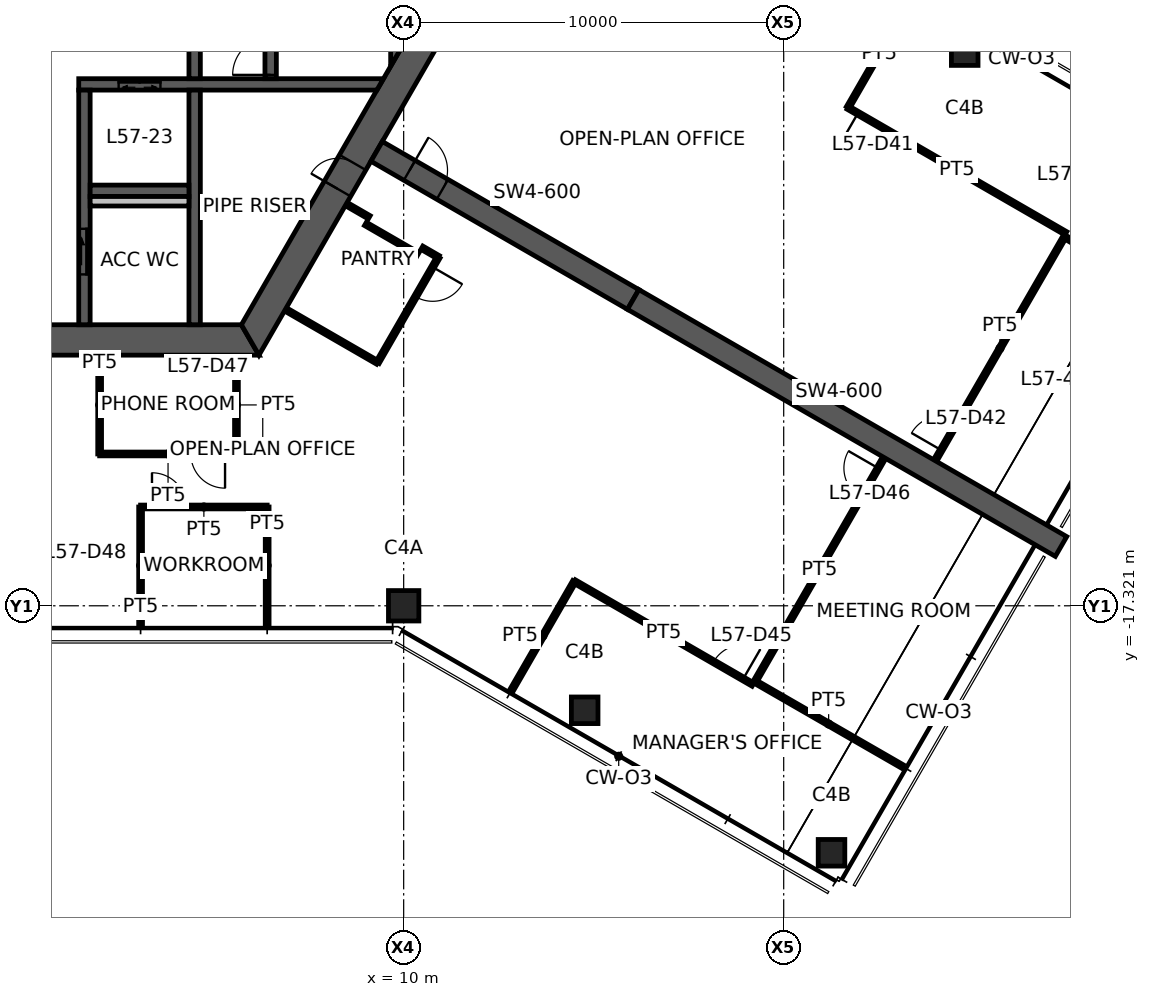
"""IFC4 building model, lengths in metres.
Left out: names, types, materials, properties, quantities, classifications, styles, units other than length and angle.
Written with IfcOpenShell. Run it as: python <this file> out.ifc"""

import sys

from ifc_helpers import new_model, si_unit, direction, frame, frame_2d, origin, origin_2d, place, context, subcontext, project, spatial, polyline, rectangle, hollow_rectangle, outline, extrude, element, fill, save


model = new_model("IFC4")
c1 = context("Model", 3, precision=1e-05, world=origin(), true_north=direction((0.0, 1.0)))
c2 = subcontext(c1, "Body", "Model", "MODEL_VIEW")
j1 = project(units=[si_unit("LENGTHUNIT", "METRE"), si_unit("PLANEANGLEUNIT", "RADIAN")], contexts=[c1])
p1 = place(None, origin())
s1 = spatial("IfcSite", under=j1, at=p1, CompositionType="ELEMENT")
p2 = place(p1, origin())
s2 = spatial("IfcBuilding", under=s1, at=p2, CompositionType="ELEMENT")
p3 = place(p2, frame((0.0, 0.0, 228.4)))
s3 = spatial("IfcBuildingStorey", under=s2, at=p3, CompositionType="ELEMENT", Elevation=228.4)
p4 = place(p3, frame((10.0, -17.321, 0.0), z_axis=(0.0, 0.0, 1.0), x_axis=(1.0, 0.0, 0.0)))
e1 = element("IfcColumn", 1, at=p4, inside=s3, PredefinedType="COLUMN", context=c2, shape_type="SweptSolid", body=[
    extrude(hollow_rectangle(XDim=0.8, YDim=0.8, WallThickness=0.04, at=origin_2d()), origin(), (0.0, 0.0, 1.0), 3.9),
])
for number, where, z_axis, x_axis in (
    (2, (14.763, -20.071, 0.0), (0.0, 0.0, 1.0), (1.0, 0.0, 0.0)),
    (3, (21.258, -23.821, 0.0), (0.0, 0.0, 1.0), (1.0, 0.0, 0.0)),
    (4, (24.763, -2.75, 0.0), (0.0, 0.0, 1.0), (1.0, 0.0, 0.0)),
):
    element("IfcColumn", number, at=place(p3, frame(where, z_axis=z_axis, x_axis=x_axis)), inside=s3, PredefinedType="COLUMN", context=c2, shape_type="SweptSolid", body=[
        extrude(hollow_rectangle(XDim=0.7, YDim=0.7, WallThickness=0.032, at=origin_2d()), origin(), (0.0, 0.0, 1.0), 3.9),
    ])
p5 = place(p3, frame((-5.961, -10.325, 0.0), z_axis=(0.0, 0.0, 1.0), x_axis=(1.0, 0.0, 0.0)))
e5 = element("IfcWall", 5, at=p5, inside=s3, PredefinedType="SHEAR", context=c2, shape_type="SweptSolid", body=[
    extrude(outline(polyline([(-0.231, -0.4), (5.461, -0.4), (6.461, -0.4), (12.153, -0.4), (11.691, 0.4), (6.461, 0.4), (5.461, 0.4), (0.231, 0.4), (-0.231, -0.4)])), origin(), (0.0, 0.0, 1.0), 3.9),
])
p6 = place(p5, frame((5.461, 0.0, 0.0)))
e6 = element("IfcOpeningElement", 6, at=p6, cuts=e5, PredefinedType="OPENING", context=c2, shape_type="SweptSolid", body=[
    extrude(rectangle(XDim=1.0, YDim=2.1, at=frame_2d((0.5, 1.05))), frame((0.0, 0.41, 0.0), z_axis=(0.0, -1.0, 0.0), x_axis=(1.0, 0.0, 0.0)), (0.0, 0.0, 1.0), 0.82),
])
p7 = place(p3, frame((5.961, -10.325, 0.0), z_axis=(0.0, 0.0, 1.0), x_axis=(0.500004296715, 0.866022923061, 0.0)))
e7 = element("IfcWall", 7, at=p7, inside=s3, PredefinedType="SHEAR", context=c2, shape_type="SweptSolid", body=[
    extrude(outline(polyline([(-0.231, -0.4), (4.594, -0.4), (5.394, -0.4), (12.153, -0.4), (11.691, 0.4), (5.394, 0.4), (4.594, 0.4), (0.231, 0.4), (-0.231, -0.4)])), origin(), (0.0, 0.0, 1.0), 3.9),
])
p8 = place(p7, frame((4.594, 0.0, 0.0)))
e8 = element("IfcOpeningElement", 8, at=p8, cuts=e7, PredefinedType="OPENING", context=c2, shape_type="SweptSolid", body=[
    extrude(rectangle(XDim=0.8, YDim=2.1, at=frame_2d((0.4, 1.05))), frame((0.0, 0.41, 0.0), z_axis=(0.0, -1.0, 0.0), x_axis=(1.0, 0.0, 0.0)), (0.0, 0.0, 1.0), 0.82),
])
p9 = place(p3, frame((9.288, -5.363, 0.0), z_axis=(0.0, 0.0, 1.0), x_axis=(0.866031736626, -0.499989031036, 0.0)))
e9 = element("IfcWall", 9, at=p9, inside=s3, PredefinedType="SHEAR", context=c2, shape_type="SweptSolid", body=[
    extrude(rectangle(XDim=7.796, YDim=0.6, at=frame_2d((3.898, 0.0))), origin(), (0.0, 0.0, 1.0), 3.9),
])
p10 = place(p9, frame((1.0, 0.0, 0.0)))
e10 = element("IfcOpeningElement", 10, at=p10, cuts=e9, PredefinedType="OPENING", context=c2, shape_type="SweptSolid", body=[
    extrude(rectangle(XDim=1.0, YDim=2.1, at=frame_2d((0.5, 1.05))), frame((0.0, 0.31, 0.0), z_axis=(0.0, -1.0, 0.0), x_axis=(1.0, 0.0, 0.0)), (0.0, 0.0, 1.0), 0.62),
])
p11 = place(p3, frame((16.039, -9.26, 0.0), z_axis=(0.0, 0.0, 1.0), x_axis=(0.866024837091, -0.50000098154, 0.0)))
e11 = element("IfcWall", 11, at=p11, inside=s3, PredefinedType="SHEAR", context=c2, shape_type="SweptSolid", body=[
    extrude(rectangle(XDim=13.0, YDim=0.6, at=frame_2d((6.5, 0.0))), origin(), (0.0, 0.0, 1.0), 3.9),
])
p12 = place(p3, frame((1.45, -3.6, 0.0), z_axis=(0.0, 0.0, 1.0), x_axis=(1.0, 0.0, 0.0)))
e12 = element("IfcWall", 12, at=p12, inside=s3, PredefinedType="SHEAR", context=c2, shape_type="SweptSolid", body=[
    extrude(outline(polyline([(0.0, -0.15), (1.05, -0.15), (2.15, -0.15), (7.845, -0.15), (8.019, 0.15), (2.15, 0.15), (1.05, 0.15), (0.0, 0.15), (0.0, -0.15)])), origin(), (0.0, 0.0, 1.0), 3.9),
])
p13 = place(p12, frame((1.05, 0.0, 0.0)))
e13 = element("IfcOpeningElement", 13, at=p13, cuts=e12, PredefinedType="OPENING", context=c2, shape_type="SweptSolid", body=[
    extrude(rectangle(XDim=1.1, YDim=2.1, at=frame_2d((0.55, 1.05))), frame((0.0, 0.16, 0.0), z_axis=(0.0, -1.0, 0.0), x_axis=(1.0, 0.0, 0.0)), (0.0, 0.0, 1.0), 0.32),
])
p14 = place(p3, frame((1.6, -3.75, 0.0), z_axis=(0.0, 0.0, 1.0), x_axis=(0.0, -1.0, 0.0)))
e14 = element("IfcWall", 14, at=p14, inside=s3, PredefinedType="SHEAR", context=c2, shape_type="SweptSolid", body=[
    extrude(rectangle(XDim=6.175, YDim=0.3, at=frame_2d((3.087, 0.0))), origin(), (0.0, 0.0, 1.0), 3.9),
])
p15 = place(p14, frame((3.65, 0.0, 0.0)))
e15 = element("IfcOpeningElement", 15, at=p15, cuts=e14, PredefinedType="OPENING", context=c2, shape_type="SweptSolid", body=[
    extrude(rectangle(XDim=1.2, YDim=2.1, at=frame_2d((0.6, 1.05))), frame((0.0, 0.16, 0.0), z_axis=(0.0, -1.0, 0.0), x_axis=(1.0, 0.0, 0.0)), (0.0, 0.0, 1.0), 0.32),
])
p16 = place(p3, frame((4.5, -3.45, 0.0), z_axis=(0.0, 0.0, 1.0), x_axis=(0.0, 1.0, 0.0)))
e16 = element("IfcWall", 16, at=p16, inside=s3, PredefinedType="SHEAR", context=c2, shape_type="SweptSolid", body=[
    extrude(rectangle(XDim=6.9, YDim=0.3, at=frame_2d((3.45, 0.0))), origin(), (0.0, 0.0, 1.0), 3.9),
])
p17 = place(p16, frame((2.95, 0.0, 0.0)))
e17 = element("IfcOpeningElement", 17, at=p17, cuts=e16, PredefinedType="OPENING", context=c2, shape_type="SweptSolid", body=[
    extrude(rectangle(XDim=1.0, YDim=2.1, at=frame_2d((0.5, 1.05))), frame((0.0, 0.16, 0.0), z_axis=(0.0, -1.0, 0.0), x_axis=(1.0, 0.0, 0.0)), (0.0, 0.0, 1.0), 0.32),
])
p18 = place(p3, frame((6.5, -3.45, 0.0), z_axis=(0.0, 0.0, 1.0), x_axis=(0.0, 1.0, 0.0)))
e18 = element("IfcWall", 18, at=p18, inside=s3, PredefinedType="SHEAR", context=c2, shape_type="SweptSolid", body=[
    extrude(rectangle(XDim=6.9, YDim=0.3, at=frame_2d((3.45, 0.0))), origin(), (0.0, 0.0, 1.0), 3.9),
])
p19 = place(p18, frame((0.1, 0.0, 0.0)))
e19 = element("IfcOpeningElement", 19, at=p19, cuts=e18, PredefinedType="OPENING", context=c2, shape_type="SweptSolid", body=[
    extrude(rectangle(XDim=1.0, YDim=2.1, at=frame_2d((0.5, 1.05))), frame((0.0, 0.16, 0.0), z_axis=(0.0, -1.0, 0.0), x_axis=(1.0, 0.0, 0.0)), (0.0, 0.0, 1.0), 0.32),
])
p20 = place(p3, frame((4.5, -3.75, 0.0), z_axis=(0.0, 0.0, 1.0), x_axis=(0.0, -1.0, 0.0)))
e20 = element("IfcWall", 20, at=p20, inside=s3, PredefinedType="SHEAR", context=c2, shape_type="SweptSolid", body=[
    extrude(rectangle(XDim=6.175, YDim=0.3, at=frame_2d((3.087, 0.0))), origin(), (0.0, 0.0, 1.0), 3.9),
])
p21 = place(p3, frame((1.75, -6.4, 0.0), z_axis=(0.0, 0.0, 1.0), x_axis=(1.0, 0.0, 0.0)))
e21 = element("IfcWall", 21, at=p21, inside=s3, PredefinedType="SHEAR", context=c2, shape_type="SweptSolid", body=[
    extrude(rectangle(XDim=2.6, YDim=0.3, at=frame_2d((1.3, 0.0))), origin(), (0.0, 0.0, 1.0), 3.9),
])
p22 = place(p3, frame((9.808, -2.862, 0.0), z_axis=(0.0, 0.0, 1.0), x_axis=(0.0, 1.0, 0.0)))
e22 = element("IfcWall", 22, at=p22, inside=s3, PredefinedType="SHEAR", context=c2, shape_type="SweptSolid", body=[
    extrude(outline(polyline([(0.26, -0.15), (5.465, -0.15), (5.984, 0.15), (-0.26, 0.15), (0.26, -0.15)])), origin(), (0.0, 0.0, 1.0), 3.9),
])
p23 = place(p3, frame((1.75, -6.675, 0.0), z_axis=(0.0, 0.0, 1.0), x_axis=(1.0, 0.0, 0.0)))
e23 = element("IfcWall", 23, at=p23, inside=s3, PredefinedType="PLUMBINGWALL", context=c2, shape_type="SweptSolid", body=[
    extrude(rectangle(XDim=2.6, YDim=0.25, at=frame_2d((1.3, 0.0))), origin(), (0.0, 0.0, 1.0), 3.9),
])
p24 = place(p3, frame((30.25, -9.266, 0.0), z_axis=(0.0, 0.0, 1.0), x_axis=(-0.865342122637, 0.501181614577, 0.0)))
e24 = element("IfcWall", 24, at=p24, inside=s3, PredefinedType="PARTITIONING", context=c2, shape_type="SweptSolid", body=[
    extrude(rectangle(XDim=3.311, YDim=0.1, at=frame_2d((1.655, 0.0))), origin(), (0.0, 0.0, 1.0), 2.95),
])
p25 = place(p3, frame((21.692, -4.21, 0.0), z_axis=(0.0, 0.0, 1.0), x_axis=(0.50002956483, 0.866008333849, 0.0)))
e25 = element("IfcWall", 25, at=p25, inside=s3, PredefinedType="PARTITIONING", context=c2, shape_type="SweptSolid", body=[
    extrude(rectangle(XDim=3.28, YDim=0.1, at=frame_2d((1.64, 0.0))), origin(), (0.0, 0.0, 1.0), 2.95),
])
p26 = place(p3, frame((27.425, -7.52, 0.0), z_axis=(0.0, 0.0, 1.0), x_axis=(-0.866030817826, 0.499990622488, 0.0)))
e26 = element("IfcWall", 26, at=p26, inside=s3, PredefinedType="PARTITIONING", context=c2, shape_type="SweptSolid", body=[
    extrude(rectangle(XDim=6.62, YDim=0.1, at=frame_2d((3.31, 0.0))), origin(), (0.0, 0.0, 1.0), 2.95),
])
p27 = place(p26, frame((5.42, 0.0, 0.0)))
e27 = element("IfcOpeningElement", 27, at=p27, cuts=e26, PredefinedType="OPENING", context=c2, shape_type="SweptSolid", body=[
    extrude(rectangle(XDim=0.9, YDim=2.1, at=frame_2d((0.45, 1.05))), frame((0.0, 0.06, 0.0), z_axis=(0.0, -1.0, 0.0), x_axis=(1.0, 0.0, 0.0)), (0.0, 0.0, 1.0), 0.12),
])
p28 = place(p3, frame((23.993, -13.483, 0.0), z_axis=(0.0, 0.0, 1.0), x_axis=(0.500522347083, 0.865723616445, 0.0)))
e28 = element("IfcWall", 28, at=p28, inside=s3, PredefinedType="PARTITIONING", context=c2, shape_type="SweptSolid", body=[
    extrude(rectangle(XDim=6.78, YDim=0.1, at=frame_2d((3.39, 0.0))), origin(), (0.0, 0.0, 1.0), 2.95),
])
p29 = place(p28, frame((0.3, 0.0, 0.0)))
e29 = element("IfcOpeningElement", 29, at=p29, cuts=e28, PredefinedType="OPENING", context=c2, shape_type="SweptSolid", body=[
    extrude(rectangle(XDim=0.9, YDim=2.1, at=frame_2d((0.45, 1.05))), frame((0.0, 0.06, 0.0), z_axis=(0.0, -1.0, 0.0), x_axis=(1.0, 0.0, 0.0)), (0.0, 0.0, 1.0), 0.12),
])
p30 = place(p3, frame((8.505, -6.758, 0.0), z_axis=(0.0, 0.0, 1.0), x_axis=(0.865958369053, -0.50011608959, 0.0)))
e30 = element("IfcWall", 30, at=p30, inside=s3, PredefinedType="PARTITIONING", context=c2, shape_type="SweptSolid", body=[
    extrude(rectangle(XDim=0.68, YDim=0.1, at=frame_2d((0.34, 0.0))), origin(), (0.0, 0.0, 1.0), 2.95),
])
p31 = place(p3, frame((8.994, -7.271, 0.0), z_axis=(0.0, 0.0, 1.0), x_axis=(0.865989903783, -0.500061482766, 0.0)))
e31 = element("IfcWall", 31, at=p31, inside=s3, PredefinedType="PARTITIONING", context=c2, shape_type="SweptSolid", body=[
    extrude(rectangle(XDim=1.6, YDim=0.1, at=frame_2d((0.8, 0.0))), origin(), (0.0, 0.0, 1.0), 2.95),
])
p32 = place(p3, frame((9.313, -10.919, 0.0), z_axis=(0.0, 0.0, 1.0), x_axis=(-0.865996920067, 0.500049332001, 0.0)))
e32 = element("IfcWall", 32, at=p32, inside=s3, PredefinedType="PARTITIONING", context=c2, shape_type="SweptSolid", body=[
    extrude(rectangle(XDim=2.78, YDim=0.1, at=frame_2d((1.39, 0.0))), origin(), (0.0, 0.0, 1.0), 2.95),
])
p33 = place(p3, frame((10.48, -7.898, 0.0), z_axis=(0.0, 0.0, 1.0), x_axis=(0.866071776036, -0.499919672301, 0.0)))
e33 = element("IfcWall", 33, at=p33, inside=s3, PredefinedType="PARTITIONING", context=c2, shape_type="SweptSolid", body=[
    extrude(rectangle(XDim=0.5, YDim=0.1, at=frame_2d((0.25, 0.0))), origin(), (0.0, 0.0, 1.0), 2.95),
])
p34 = place(p3, frame((10.913, -8.148, 0.0), z_axis=(0.0, 0.0, 1.0), x_axis=(-0.500028443584, -0.866008981251, 0.0)))
e34 = element("IfcWall", 34, at=p34, inside=s3, PredefinedType="PARTITIONING", context=c2, shape_type="SweptSolid", body=[
    extrude(rectangle(XDim=3.2, YDim=0.1, at=frame_2d((1.6, 0.0))), origin(), (0.0, 0.0, 1.0), 2.95),
])
p35 = place(p34, frame((0.3, 0.0, 0.0)))
e35 = element("IfcOpeningElement", 35, at=p35, cuts=e34, PredefinedType="OPENING", context=c2, shape_type="SweptSolid", body=[
    extrude(rectangle(XDim=0.9, YDim=2.1, at=frame_2d((0.45, 1.05))), frame((0.0, 0.06, 0.0), z_axis=(0.0, -1.0, 0.0), x_axis=(1.0, 0.0, 0.0)), (0.0, 0.0, 1.0), 0.12),
])
p36 = place(p3, frame((19.241, -19.313, 0.0), z_axis=(0.0, 0.0, 1.0), x_axis=(0.866534622614, -0.499116968066, 0.0)))
e36 = element("IfcWall", 36, at=p36, inside=s3, PredefinedType="PARTITIONING", context=c2, shape_type="SweptSolid", body=[
    extrude(rectangle(XDim=4.48, YDim=0.1, at=frame_2d((2.24, 0.0))), origin(), (0.0, 0.0, 1.0), 2.95),
])
p37 = place(p3, frame((12.837, -19.548, 0.0), z_axis=(0.0, 0.0, 1.0), x_axis=(0.499890550747, 0.866088585119, 0.0)))
e37 = element("IfcWall", 37, at=p37, inside=s3, PredefinedType="PARTITIONING", context=c2, shape_type="SweptSolid", body=[
    extrude(rectangle(XDim=3.311, YDim=0.1, at=frame_2d((1.655, 0.0))), origin(), (0.0, 0.0, 1.0), 2.95),
])
p38 = place(p3, frame((14.492, -16.68, 0.0), z_axis=(0.0, 0.0, 1.0), x_axis=(0.866056782721, -0.499945646148, 0.0)))
e38 = element("IfcWall", 38, at=p38, inside=s3, PredefinedType="PARTITIONING", context=c2, shape_type="SweptSolid", body=[
    extrude(rectangle(XDim=5.429, YDim=0.1, at=frame_2d((2.714, 0.0))), origin(), (0.0, 0.0, 1.0), 2.95),
])
p39 = place(p38, frame((4.229, 0.0, 0.0)))
e39 = element("IfcOpeningElement", 39, at=p39, cuts=e38, PredefinedType="OPENING", context=c2, shape_type="SweptSolid", body=[
    extrude(rectangle(XDim=0.9, YDim=2.1, at=frame_2d((0.45, 1.05))), frame((0.0, 0.06, 0.0), z_axis=(0.0, -1.0, 0.0), x_axis=(1.0, 0.0, 0.0)), (0.0, 0.0, 1.0), 0.12),
])
p40 = place(p3, frame((19.248, -19.311, 0.0), z_axis=(0.0, 0.0, 1.0), x_axis=(0.499489671712, 0.866319841544, 0.0)))
e40 = element("IfcWall", 40, at=p40, inside=s3, PredefinedType="PARTITIONING", context=c2, shape_type="SweptSolid", body=[
    extrude(rectangle(XDim=6.78, YDim=0.1, at=frame_2d((3.39, 0.0))), origin(), (0.0, 0.0, 1.0), 2.95),
])
p41 = place(p40, frame((5.58, 0.0, 0.0)))
e41 = element("IfcOpeningElement", 41, at=p41, cuts=e40, PredefinedType="OPENING", context=c2, shape_type="SweptSolid", body=[
    extrude(rectangle(XDim=0.9, YDim=2.1, at=frame_2d((0.45, 1.05))), frame((0.0, 0.06, 0.0), z_axis=(0.0, -1.0, 0.0), x_axis=(1.0, 0.0, 0.0)), (0.0, 0.0, 1.0), 0.12),
])
p42 = place(p3, frame((2.0, -13.325, 0.0), z_axis=(0.0, 0.0, 1.0), x_axis=(0.0, 1.0, 0.0)))
e42 = element("IfcWall", 42, at=p42, inside=s3, PredefinedType="PARTITIONING", context=c2, shape_type="SweptSolid", body=[
    extrude(rectangle(XDim=2.58, YDim=0.1, at=frame_2d((1.29, 0.0))), origin(), (0.0, 0.0, 1.0), 2.95),
])
p43 = place(p3, frame((5.6, -13.325, 0.0), z_axis=(0.0, 0.0, 1.0), x_axis=(-1.0, 0.0, 0.0)))
e43 = element("IfcWall", 43, at=p43, inside=s3, PredefinedType="PARTITIONING", context=c2, shape_type="SweptSolid", body=[
    extrude(rectangle(XDim=3.6, YDim=0.1, at=frame_2d((1.8, 0.0))), origin(), (0.0, 0.0, 1.0), 2.95),
])
p44 = place(p43, frame((0.3, 0.0, 0.0)))
e44 = element("IfcOpeningElement", 44, at=p44, cuts=e43, PredefinedType="OPENING", context=c2, shape_type="SweptSolid", body=[
    extrude(rectangle(XDim=0.9, YDim=2.1, at=frame_2d((0.45, 1.05))), frame((0.0, 0.06, 0.0), z_axis=(0.0, -1.0, 0.0), x_axis=(1.0, 0.0, 0.0)), (0.0, 0.0, 1.0), 0.12),
])
p45 = place(p3, frame((5.6, -10.745, 0.0), z_axis=(0.0, 0.0, 1.0), x_axis=(0.0, -1.0, 0.0)))
e45 = element("IfcWall", 45, at=p45, inside=s3, PredefinedType="PARTITIONING", context=c2, shape_type="SweptSolid", body=[
    extrude(rectangle(XDim=2.58, YDim=0.1, at=frame_2d((1.29, 0.0))), origin(), (0.0, 0.0, 1.0), 2.95),
])
p46 = place(p3, frame((3.077, -17.801, 0.0), z_axis=(0.0, 0.0, 1.0), x_axis=(0.0, 1.0, 0.0)))
e46 = element("IfcWall", 46, at=p46, inside=s3, PredefinedType="PARTITIONING", context=c2, shape_type="SweptSolid", body=[
    extrude(rectangle(XDim=3.08, YDim=0.1, at=frame_2d((1.54, 0.0))), origin(), (0.0, 0.0, 1.0), 2.95),
])
p47 = place(p3, frame((3.077, -14.72, 0.0), z_axis=(0.0, 0.0, 1.0), x_axis=(1.0, 0.0, 0.0)))
e47 = element("IfcWall", 47, at=p47, inside=s3, PredefinedType="PARTITIONING", context=c2, shape_type="SweptSolid", body=[
    extrude(rectangle(XDim=3.331, YDim=0.1, at=frame_2d((1.666, 0.0))), origin(), (0.0, 0.0, 1.0), 2.95),
])
p48 = place(p47, frame((0.3, 0.0, 0.0)))
e48 = element("IfcOpeningElement", 48, at=p48, cuts=e47, PredefinedType="OPENING", context=c2, shape_type="SweptSolid", body=[
    extrude(rectangle(XDim=0.9, YDim=2.1, at=frame_2d((0.45, 1.05))), frame((0.0, 0.06, 0.0), z_axis=(0.0, -1.0, 0.0), x_axis=(1.0, 0.0, 0.0)), (0.0, 0.0, 1.0), 0.12),
])
p49 = place(p3, frame((6.408, -14.72, 0.0), z_axis=(0.0, 0.0, 1.0), x_axis=(0.0, -1.0, 0.0)))
e49 = element("IfcWall", 49, at=p49, inside=s3, PredefinedType="PARTITIONING", context=c2, shape_type="SweptSolid", body=[
    extrude(rectangle(XDim=3.08, YDim=0.1, at=frame_2d((1.54, 0.0))), origin(), (0.0, 0.0, 1.0), 2.95),
])
p50 = place(p8, origin())
e50 = element("IfcDoor", 50, at=p50, inside=s3, OperationType="SINGLE_SWING_LEFT", PredefinedType="DOOR", context=c2, shape_type="SweptSolid", body=[
    extrude(rectangle(XDim=0.8, YDim=2.1, at=frame_2d((0.4, 1.05))), frame((0.0, 0.025, 0.0), z_axis=(0.0, -1.0, 0.0), x_axis=(1.0, 0.0, 0.0)), (0.0, 0.0, 1.0), 0.05),
])
fill(e8, e50)
p51 = place(p19, origin())
e51 = element("IfcDoor", 51, at=p51, inside=s3, OperationType="SINGLE_SWING_LEFT", PredefinedType="DOOR", context=c2, shape_type="SweptSolid", body=[
    extrude(rectangle(XDim=1.0, YDim=2.1, at=frame_2d((0.5, 1.05))), frame((0.0, 0.025, 0.0), z_axis=(0.0, -1.0, 0.0), x_axis=(1.0, 0.0, 0.0)), (0.0, 0.0, 1.0), 0.05),
])
fill(e19, e51)
p52 = place(p15, origin())
e52 = element("IfcDoor", 52, at=p52, inside=s3, OperationType="SLIDING_TO_LEFT", PredefinedType="DOOR", context=c2, shape_type="SweptSolid", body=[
    extrude(rectangle(XDim=1.2, YDim=2.1, at=frame_2d((0.6, 1.05))), frame((0.0, 0.025, 0.0), z_axis=(0.0, -1.0, 0.0), x_axis=(1.0, 0.0, 0.0)), (0.0, 0.0, 1.0), 0.05),
])
fill(e15, e52)
p53 = place(p10, origin())
e53 = element("IfcDoor", 53, at=p53, inside=s3, OperationType="SINGLE_SWING_LEFT", PredefinedType="DOOR", context=c2, shape_type="SweptSolid", body=[
    extrude(rectangle(XDim=1.0, YDim=2.1, at=frame_2d((0.5, 1.05))), frame((0.0, 0.025, 0.0), z_axis=(0.0, -1.0, 0.0), x_axis=(1.0, 0.0, 0.0)), (0.0, 0.0, 1.0), 0.05),
])
fill(e10, e53)
p54 = place(p27, origin())
e54 = element("IfcDoor", 54, at=p54, inside=s3, OperationType="SINGLE_SWING_RIGHT", PredefinedType="DOOR", context=c2, shape_type="SweptSolid", body=[
    extrude(rectangle(XDim=0.9, YDim=2.1, at=frame_2d((0.45, 1.05))), frame((0.0, 0.025, 0.0), z_axis=(0.0, -1.0, 0.0), x_axis=(1.0, 0.0, 0.0)), (0.0, 0.0, 1.0), 0.05),
])
fill(e27, e54)
p55 = place(p29, origin())
e55 = element("IfcDoor", 55, at=p55, inside=s3, OperationType="SINGLE_SWING_LEFT", PredefinedType="DOOR", context=c2, shape_type="SweptSolid", body=[
    extrude(rectangle(XDim=0.9, YDim=2.1, at=frame_2d((0.45, 1.05))), frame((0.0, 0.025, 0.0), z_axis=(0.0, -1.0, 0.0), x_axis=(1.0, 0.0, 0.0)), (0.0, 0.0, 1.0), 0.05),
])
fill(e29, e55)
p56 = place(p35, origin())
e56 = element("IfcDoor", 56, at=p56, inside=s3, OperationType="SINGLE_SWING_LEFT", PredefinedType="DOOR", context=c2, shape_type="SweptSolid", body=[
    extrude(rectangle(XDim=0.9, YDim=2.1, at=frame_2d((0.45, 1.05))), frame((0.0, 0.025, 0.0), z_axis=(0.0, -1.0, 0.0), x_axis=(1.0, 0.0, 0.0)), (0.0, 0.0, 1.0), 0.05),
])
fill(e35, e56)
p57 = place(p39, origin())
e57 = element("IfcDoor", 57, at=p57, inside=s3, OperationType="SINGLE_SWING_RIGHT", PredefinedType="DOOR", context=c2, shape_type="SweptSolid", body=[
    extrude(rectangle(XDim=0.9, YDim=2.1, at=frame_2d((0.45, 1.05))), frame((0.0, 0.025, 0.0), z_axis=(0.0, -1.0, 0.0), x_axis=(1.0, 0.0, 0.0)), (0.0, 0.0, 1.0), 0.05),
])
fill(e39, e57)
p58 = place(p41, origin())
e58 = element("IfcDoor", 58, at=p58, inside=s3, OperationType="SINGLE_SWING_RIGHT", PredefinedType="DOOR", context=c2, shape_type="SweptSolid", body=[
    extrude(rectangle(XDim=0.9, YDim=2.1, at=frame_2d((0.45, 1.05))), frame((0.0, 0.025, 0.0), z_axis=(0.0, -1.0, 0.0), x_axis=(1.0, 0.0, 0.0)), (0.0, 0.0, 1.0), 0.05),
])
fill(e41, e58)
p59 = place(p44, origin())
e59 = element("IfcDoor", 59, at=p59, inside=s3, OperationType="SINGLE_SWING_LEFT", PredefinedType="DOOR", context=c2, shape_type="SweptSolid", body=[
    extrude(rectangle(XDim=0.9, YDim=2.1, at=frame_2d((0.45, 1.05))), frame((0.0, 0.025, 0.0), z_axis=(0.0, -1.0, 0.0), x_axis=(1.0, 0.0, 0.0)), (0.0, 0.0, 1.0), 0.05),
])
fill(e44, e59)
p60 = place(p48, origin())
e60 = element("IfcDoor", 60, at=p60, inside=s3, OperationType="SINGLE_SWING_LEFT", PredefinedType="DOOR", context=c2, shape_type="SweptSolid", body=[
    extrude(rectangle(XDim=0.9, YDim=2.1, at=frame_2d((0.45, 1.05))), frame((0.0, 0.025, 0.0), z_axis=(0.0, -1.0, 0.0), x_axis=(1.0, 0.0, 0.0)), (0.0, 0.0, 1.0), 0.05),
])
fill(e48, e60)
p61 = place(p13, origin())
e61 = element("IfcDoor", 61, at=p61, inside=s3, OperationType="DOUBLE_DOOR_SLIDING", PredefinedType="DOOR", context=c2, shape_type="SweptSolid", body=[
    extrude(rectangle(XDim=1.1, YDim=2.1, at=frame_2d((0.55, 1.05))), frame((0.0, 0.025, 0.0), z_axis=(0.0, -1.0, 0.0), x_axis=(1.0, 0.0, 0.0)), (0.0, 0.0, 1.0), 0.05),
])
fill(e13, e61)
save(model, sys.argv[1])
